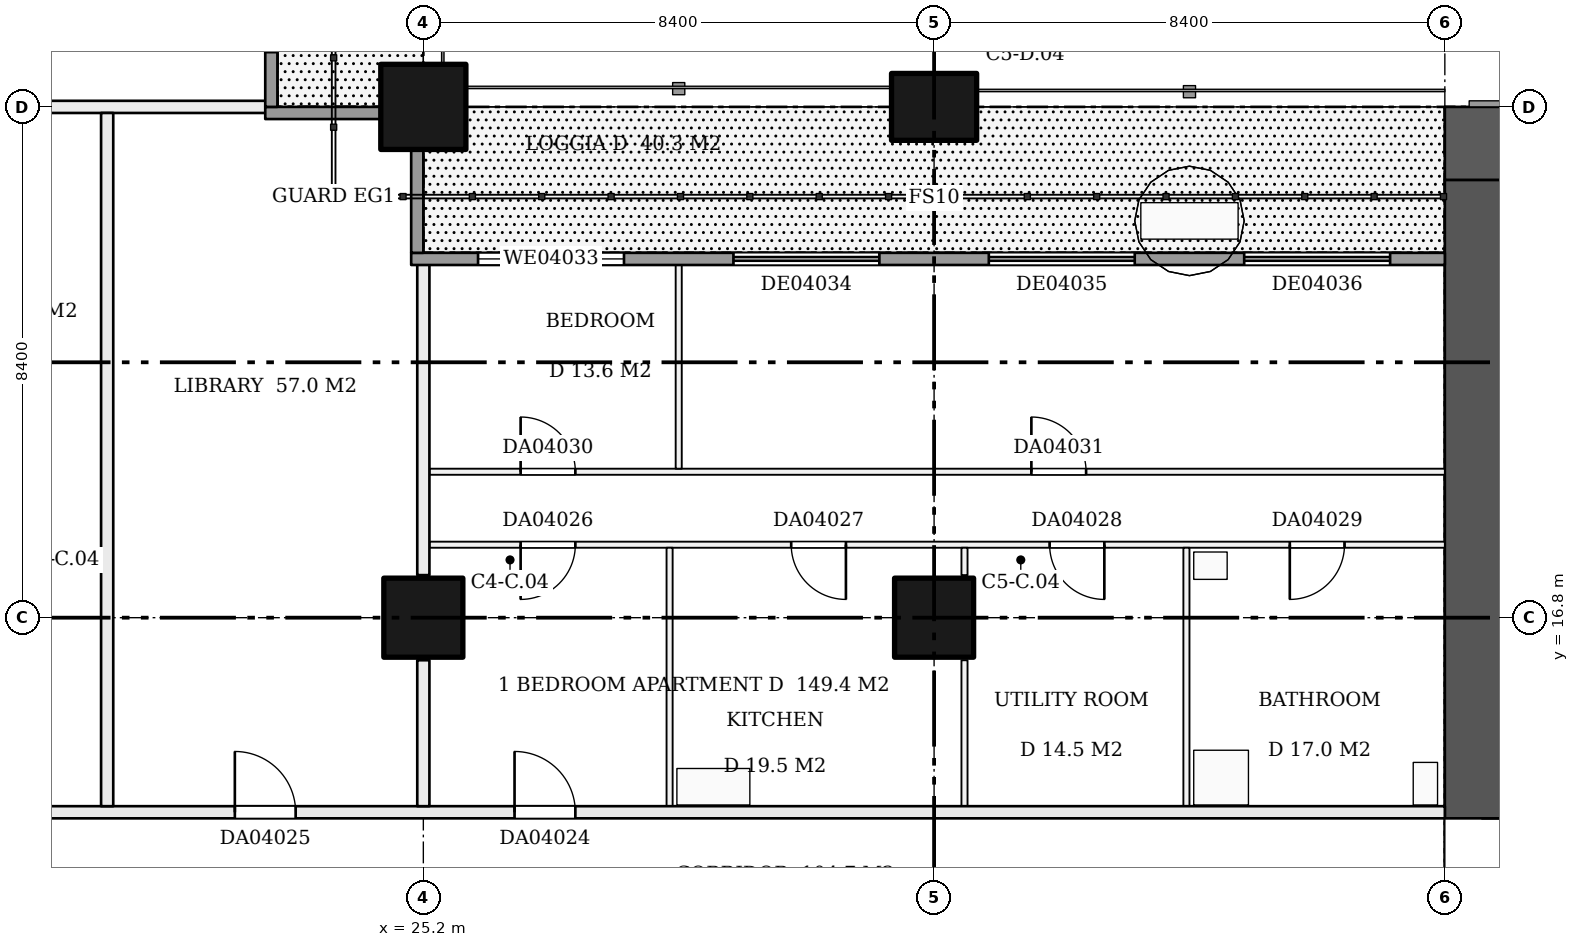
"""IFC4 building model, lengths in metres.
Left out: names, types, materials, properties, quantities, classifications, styles, units other than length and angle.
Written with IfcOpenShell. Run it as: python <this file> out.ifc"""

import sys

from ifc_helpers import new_model, si_unit, direction, frame, frame_2d, origin, origin_2d, place, context, subcontext, project, spatial, rectangle, extrude, element, fill, save


model = new_model("IFC4")
c1 = context("Model", 3, precision=1e-05, world=origin(), true_north=direction((0.0, 1.0)))
c2 = subcontext(c1, "Body", "Model", "MODEL_VIEW")
j1 = project(units=[si_unit("LENGTHUNIT", "METRE"), si_unit("PLANEANGLEUNIT", "RADIAN")], contexts=[c1])
p1 = place(None, origin())
s1 = spatial("IfcSite", under=j1, at=p1, CompositionType="ELEMENT")
p2 = place(p1, origin())
s2 = spatial("IfcBuilding", under=s1, at=p2, CompositionType="ELEMENT")
p3 = place(p2, frame((0.0, 0.0, 25.2)))
s3 = spatial("IfcBuildingStorey", under=s2, at=p3, CompositionType="ELEMENT", Elevation=25.2)
p4 = place(p3, frame((25.2, 16.8, 0.0), z_axis=(0.0, 0.0, 1.0), x_axis=(1.0, 0.0, 0.0)))
e1 = element("IfcColumn", 1, at=p4, inside=s3, PredefinedType="COLUMN", context=c2, shape_type="SweptSolid", body=[
    extrude(rectangle(XDim=1.3, YDim=1.3, at=origin_2d()), origin(), (0.0, 0.0, 1.0), 3.22),
])
p5 = place(p3, frame((25.2, 25.2, 0.0), z_axis=(0.0, 0.0, 1.0), x_axis=(1.0, 0.0, 0.0)))
e2 = element("IfcColumn", 2, at=p5, inside=s3, PredefinedType="COLUMN", context=c2, shape_type="SweptSolid", body=[
    extrude(rectangle(XDim=1.4, YDim=1.4, at=origin_2d()), origin(), (0.0, 0.0, 1.0), 3.22),
])
p6 = place(p3, frame((33.6, 16.8, 0.0), z_axis=(0.0, 0.0, 1.0), x_axis=(1.0, 0.0, 0.0)))
e3 = element("IfcColumn", 3, at=p6, inside=s3, PredefinedType="COLUMN", context=c2, shape_type="SweptSolid", body=[
    extrude(rectangle(XDim=1.3, YDim=1.3, at=origin_2d()), origin(), (0.0, 0.0, 1.0), 3.22),
])
p7 = place(p3, frame((33.6, 25.2, 0.0), z_axis=(0.0, 0.0, 1.0), x_axis=(1.0, 0.0, 0.0)))
e4 = element("IfcColumn", 4, at=p7, inside=s3, PredefinedType="COLUMN", context=c2, shape_type="SweptSolid", body=[
    extrude(rectangle(XDim=1.4, YDim=1.1, at=origin_2d()), origin(), (0.0, 0.0, 1.0), 3.22),
])
p8 = place(p3, frame((42.0, 24.6, 0.0), z_axis=(0.0, 0.0, 1.0), x_axis=(1.0, 0.0, 0.0)))
e5 = element("IfcWall", 5, at=p8, inside=s3, PredefinedType="SHEAR", context=c2, shape_type="SweptSolid", body=[
    extrude(rectangle(XDim=16.8, YDim=1.2, at=frame_2d((8.4, 0.0))), origin(), (0.0, 0.0, 1.0), 3.22),
])
p9 = place(p8, frame((1.8, 0.0, 0.5)))
e6 = element("IfcOpeningElement", 6, at=p9, cuts=e5, PredefinedType="OPENING", context=c2, shape_type="SweptSolid", body=[
    extrude(rectangle(XDim=1.8, YDim=2.4, at=frame_2d((0.9, 1.2))), frame((0.0, 0.61, 0.0), z_axis=(0.0, -1.0, 0.0), x_axis=(1.0, 0.0, 0.0)), (0.0, 0.0, 1.0), 1.22),
])
p10 = place(p8, frame((5.25, 0.0, 1.6)))
e7 = element("IfcOpeningElement", 7, at=p10, cuts=e5, PredefinedType="OPENING", context=c2, shape_type="SweptSolid", body=[
    extrude(rectangle(XDim=3.0, YDim=1.2, at=frame_2d((1.5, 0.6))), frame((0.0, 0.61, 0.0), z_axis=(0.0, -1.0, 0.0), x_axis=(1.0, 0.0, 0.0)), (0.0, 0.0, 1.0), 1.22),
])
p11 = place(p8, frame((12.65, 0.0, 0.5)))
e8 = element("IfcOpeningElement", 8, at=p11, cuts=e5, PredefinedType="OPENING", context=c2, shape_type="SweptSolid", body=[
    extrude(rectangle(XDim=1.8, YDim=2.4, at=frame_2d((0.9, 1.2))), frame((0.0, 0.61, 0.0), z_axis=(0.0, -1.0, 0.0), x_axis=(1.0, 0.0, 0.0)), (0.0, 0.0, 1.0), 1.22),
])
p12 = place(p3, frame((42.6, 9.6, 0.0), z_axis=(0.0, 0.0, 1.0), x_axis=(0.0, 1.0, 0.0)))
e9 = element("IfcWall", 9, at=p12, inside=s3, PredefinedType="SHEAR", context=c2, shape_type="SweptSolid", body=[
    extrude(rectangle(XDim=14.4, YDim=1.2, at=frame_2d((7.2, 0.0))), origin(), (0.0, 0.0, 1.0), 3.22),
])
p13 = place(p12, frame((2.1, 0.0, 0.0)))
e10 = element("IfcOpeningElement", 10, at=p13, cuts=e9, PredefinedType="OPENING", context=c2, shape_type="SweptSolid", body=[
    extrude(rectangle(XDim=1.8, YDim=2.1, at=frame_2d((0.9, 1.05))), frame((0.0, 0.61, 0.0), z_axis=(0.0, -1.0, 0.0), x_axis=(1.0, 0.0, 0.0)), (0.0, 0.0, 1.0), 1.22),
])
p14 = place(p3, frame((16.9, 13.6, 0.0), z_axis=(0.0, 0.0, 1.0), x_axis=(1.0, 0.0, 0.0)))
e11 = element("IfcWall", 11, at=p14, inside=s3, PredefinedType="PARTITIONING", context=c2, shape_type="SweptSolid", body=[
    extrude(rectangle(XDim=25.1, YDim=0.2, at=frame_2d((12.55, 0.0))), origin(), (0.0, 0.0, 1.0), 3.22),
])
p15 = place(p14, frame((9.8, 0.0, 0.0)))
e12 = element("IfcOpeningElement", 12, at=p15, cuts=e11, PredefinedType="OPENING", context=c2, shape_type="SweptSolid", body=[
    extrude(rectangle(XDim=1.0, YDim=2.1, at=frame_2d((0.5, 1.05))), frame((0.0, 0.11, 0.0), z_axis=(0.0, -1.0, 0.0), x_axis=(1.0, 0.0, 0.0)), (0.0, 0.0, 1.0), 0.22),
])
p16 = place(p14, frame((5.2, 0.0, 0.0)))
e13 = element("IfcOpeningElement", 13, at=p16, cuts=e11, PredefinedType="OPENING", context=c2, shape_type="SweptSolid", body=[
    extrude(rectangle(XDim=1.0, YDim=2.1, at=frame_2d((0.5, 1.05))), frame((0.0, 0.11, 0.0), z_axis=(0.0, -1.0, 0.0), x_axis=(1.0, 0.0, 0.0)), (0.0, 0.0, 1.0), 0.22),
])
p17 = place(p3, frame((25.3, 18.0, 0.0), z_axis=(0.0, 0.0, 1.0), x_axis=(1.0, 0.0, 0.0)))
e14 = element("IfcWall", 14, at=p17, inside=s3, PredefinedType="PARTITIONING", context=c2, shape_type="SweptSolid", body=[
    extrude(rectangle(XDim=16.7, YDim=0.1, at=frame_2d((8.35, 0.0))), origin(), (0.0, 0.0, 1.0), 3.22),
])
p18 = place(p17, frame((1.5, 0.0, 0.0)))
e15 = element("IfcOpeningElement", 15, at=p18, cuts=e14, PredefinedType="OPENING", context=c2, shape_type="SweptSolid", body=[
    extrude(rectangle(XDim=0.9, YDim=2.1, at=frame_2d((0.45, 1.05))), frame((0.0, 0.06, 0.0), z_axis=(0.0, -1.0, 0.0), x_axis=(1.0, 0.0, 0.0)), (0.0, 0.0, 1.0), 0.12),
])
p19 = place(p17, frame((5.95, 0.0, 0.0)))
e16 = element("IfcOpeningElement", 16, at=p19, cuts=e14, PredefinedType="OPENING", context=c2, shape_type="SweptSolid", body=[
    extrude(rectangle(XDim=0.9, YDim=2.1, at=frame_2d((0.45, 1.05))), frame((0.0, 0.06, 0.0), z_axis=(0.0, -1.0, 0.0), x_axis=(1.0, 0.0, 0.0)), (0.0, 0.0, 1.0), 0.12),
])
p20 = place(p17, frame((10.2, 0.0, 0.0)))
e17 = element("IfcOpeningElement", 17, at=p20, cuts=e14, PredefinedType="OPENING", context=c2, shape_type="SweptSolid", body=[
    extrude(rectangle(XDim=0.9, YDim=2.1, at=frame_2d((0.45, 1.05))), frame((0.0, 0.06, 0.0), z_axis=(0.0, -1.0, 0.0), x_axis=(1.0, 0.0, 0.0)), (0.0, 0.0, 1.0), 0.12),
])
p21 = place(p17, frame((14.15, 0.0, 0.0)))
e18 = element("IfcOpeningElement", 18, at=p21, cuts=e14, PredefinedType="OPENING", context=c2, shape_type="SweptSolid", body=[
    extrude(rectangle(XDim=0.9, YDim=2.1, at=frame_2d((0.45, 1.05))), frame((0.0, 0.06, 0.0), z_axis=(0.0, -1.0, 0.0), x_axis=(1.0, 0.0, 0.0)), (0.0, 0.0, 1.0), 0.12),
])
p22 = place(p3, frame((25.3, 19.2, 0.0), z_axis=(0.0, 0.0, 1.0), x_axis=(1.0, 0.0, 0.0)))
e19 = element("IfcWall", 19, at=p22, inside=s3, PredefinedType="PARTITIONING", context=c2, shape_type="SweptSolid", body=[
    extrude(rectangle(XDim=16.7, YDim=0.1, at=frame_2d((8.35, 0.0))), origin(), (0.0, 0.0, 1.0), 3.22),
])
p23 = place(p22, frame((1.5, 0.0, 0.0)))
e20 = element("IfcOpeningElement", 20, at=p23, cuts=e19, PredefinedType="OPENING", context=c2, shape_type="SweptSolid", body=[
    extrude(rectangle(XDim=0.9, YDim=2.1, at=frame_2d((0.45, 1.05))), frame((0.0, 0.06, 0.0), z_axis=(0.0, -1.0, 0.0), x_axis=(1.0, 0.0, 0.0)), (0.0, 0.0, 1.0), 0.12),
])
p24 = place(p22, frame((9.9, 0.0, 0.0)))
e21 = element("IfcOpeningElement", 21, at=p24, cuts=e19, PredefinedType="OPENING", context=c2, shape_type="SweptSolid", body=[
    extrude(rectangle(XDim=0.9, YDim=2.1, at=frame_2d((0.45, 1.05))), frame((0.0, 0.06, 0.0), z_axis=(0.0, -1.0, 0.0), x_axis=(1.0, 0.0, 0.0)), (0.0, 0.0, 1.0), 0.12),
])
p25 = place(p3, frame((17.5, 25.2, 0.0), z_axis=(0.0, 0.0, 1.0), x_axis=(1.0, 0.0, 0.0)))
e22 = element("IfcWall", 22, at=p25, inside=s3, PredefinedType="PARTITIONING", context=c2, shape_type="SweptSolid", body=[
    extrude(rectangle(XDim=5.2, YDim=0.2, at=frame_2d((2.6, 0.0))), origin(), (0.0, 0.0, 1.0), 3.22),
])
p26 = place(p3, frame((20.0, 13.7, 0.0), z_axis=(0.0, 0.0, 1.0), x_axis=(0.0, 1.0, 0.0)))
e23 = element("IfcWall", 23, at=p26, inside=s3, PredefinedType="PARTITIONING", context=c2, shape_type="SweptSolid", body=[
    extrude(rectangle(XDim=11.4, YDim=0.2, at=frame_2d((5.7, 0.0))), origin(), (0.0, 0.0, 1.0), 3.22),
])
p27 = place(p3, frame((25.2, 13.7, 0.0), z_axis=(0.0, 0.0, 1.0), x_axis=(0.0, 1.0, 0.0)))
e24 = element("IfcWall", 24, at=p27, inside=s3, PredefinedType="PARTITIONING", context=c2, shape_type="SweptSolid", body=[
    extrude(rectangle(XDim=2.4, YDim=0.2, at=frame_2d((1.2, 0.0))), origin(), (0.0, 0.0, 1.0), 3.22),
])
p28 = place(p3, frame((25.2, 17.5, 0.0), z_axis=(0.0, 0.0, 1.0), x_axis=(0.0, 1.0, 0.0)))
e25 = element("IfcWall", 25, at=p28, inside=s3, PredefinedType="PARTITIONING", context=c2, shape_type="SweptSolid", body=[
    extrude(rectangle(XDim=5.2, YDim=0.2, at=frame_2d((2.6, 0.0))), origin(), (0.0, 0.0, 1.0), 3.22),
])
p29 = place(p3, frame((29.25, 13.7, 0.0), z_axis=(0.0, 0.0, 1.0), x_axis=(0.0, 1.0, 0.0)))
e26 = element("IfcWall", 26, at=p29, inside=s3, PredefinedType="PARTITIONING", context=c2, shape_type="SweptSolid", body=[
    extrude(rectangle(XDim=4.25, YDim=0.1, at=frame_2d((2.125, 0.0))), origin(), (0.0, 0.0, 1.0), 3.22),
])
p30 = place(p3, frame((29.4, 19.25, 0.0), z_axis=(0.0, 0.0, 1.0), x_axis=(0.0, 1.0, 0.0)))
e27 = element("IfcWall", 27, at=p30, inside=s3, PredefinedType="PARTITIONING", context=c2, shape_type="SweptSolid", body=[
    extrude(rectangle(XDim=3.45, YDim=0.1, at=frame_2d((1.725, 0.0))), origin(), (0.0, 0.0, 1.0), 3.22),
])
p31 = place(p3, frame((34.1, 13.7, 0.0), z_axis=(0.0, 0.0, 1.0), x_axis=(0.0, 1.0, 0.0)))
e28 = element("IfcWall", 28, at=p31, inside=s3, PredefinedType="PARTITIONING", context=c2, shape_type="SweptSolid", body=[
    extrude(rectangle(XDim=2.4, YDim=0.1, at=frame_2d((1.2, 0.0))), origin(), (0.0, 0.0, 1.0), 3.22),
])
p32 = place(p3, frame((34.1, 17.5, 0.0), z_axis=(0.0, 0.0, 1.0), x_axis=(0.0, 1.0, 0.0)))
e29 = element("IfcWall", 29, at=p32, inside=s3, PredefinedType="PARTITIONING", context=c2, shape_type="SweptSolid", body=[
    extrude(rectangle(XDim=0.45, YDim=0.1, at=frame_2d((0.225, 0.0))), origin(), (0.0, 0.0, 1.0), 3.22),
])
p33 = place(p3, frame((37.75, 13.7, 0.0), z_axis=(0.0, 0.0, 1.0), x_axis=(0.0, 1.0, 0.0)))
e30 = element("IfcWall", 30, at=p33, inside=s3, PredefinedType="PARTITIONING", context=c2, shape_type="SweptSolid", body=[
    extrude(rectangle(XDim=4.25, YDim=0.1, at=frame_2d((2.125, 0.0))), origin(), (0.0, 0.0, 1.0), 3.22),
])
p34 = place(p3, frame((42.0, 22.7, 0.0), z_axis=(0.0, 0.0, 1.0), x_axis=(-1.0, 0.0, 0.0)))
e31 = element("IfcWall", 31, at=p34, inside=s3, PredefinedType="SOLIDWALL", context=c2, shape_type="SweptSolid", body=[
    extrude(rectangle(XDim=17.0, YDim=0.2, at=frame_2d((8.5, 0.0))), origin(), (0.0, 0.0, 1.0), 3.22),
])
p35 = place(p34, frame((13.5, 0.0, 0.9)))
e32 = element("IfcOpeningElement", 32, at=p35, cuts=e31, PredefinedType="OPENING", context=c2, shape_type="SweptSolid", body=[
    extrude(rectangle(XDim=2.4, YDim=1.5, at=frame_2d((1.2, 0.75))), frame((0.0, 0.11, 0.0), z_axis=(0.0, -1.0, 0.0), x_axis=(1.0, 0.0, 0.0)), (0.0, 0.0, 1.0), 0.22),
])
p36 = place(p34, frame((9.3, 0.0, 0.0)))
e33 = element("IfcOpeningElement", 33, at=p36, cuts=e31, PredefinedType="OPENING", context=c2, shape_type="SweptSolid", body=[
    extrude(rectangle(XDim=2.4, YDim=2.2, at=frame_2d((1.2, 1.1))), frame((0.0, 0.11, 0.0), z_axis=(0.0, -1.0, 0.0), x_axis=(1.0, 0.0, 0.0)), (0.0, 0.0, 1.0), 0.22),
])
p37 = place(p34, frame((5.1, 0.0, 0.0)))
e34 = element("IfcOpeningElement", 34, at=p37, cuts=e31, PredefinedType="OPENING", context=c2, shape_type="SweptSolid", body=[
    extrude(rectangle(XDim=2.4, YDim=2.2, at=frame_2d((1.2, 1.1))), frame((0.0, 0.11, 0.0), z_axis=(0.0, -1.0, 0.0), x_axis=(1.0, 0.0, 0.0)), (0.0, 0.0, 1.0), 0.22),
])
p38 = place(p34, frame((0.9, 0.0, 0.0)))
e35 = element("IfcOpeningElement", 35, at=p38, cuts=e31, PredefinedType="OPENING", context=c2, shape_type="SweptSolid", body=[
    extrude(rectangle(XDim=2.4, YDim=2.2, at=frame_2d((1.2, 1.1))), frame((0.0, 0.11, 0.0), z_axis=(0.0, -1.0, 0.0), x_axis=(1.0, 0.0, 0.0)), (0.0, 0.0, 1.0), 0.22),
])
p39 = place(p3, frame((25.1, 22.8, 0.0), z_axis=(0.0, 0.0, 1.0), x_axis=(0.0, 1.0, 0.0)))
e36 = element("IfcWall", 36, at=p39, inside=s3, PredefinedType="SOLIDWALL", context=c2, shape_type="SweptSolid", body=[
    extrude(rectangle(XDim=1.7, YDim=0.2, at=frame_2d((0.85, 0.0))), origin(), (0.0, 0.0, 1.0), 3.22),
])
p40 = place(p3, frame((24.5, 25.1, 0.0), z_axis=(0.0, 0.0, 1.0), x_axis=(-1.0, 0.0, 0.0)))
e37 = element("IfcWall", 37, at=p40, inside=s3, PredefinedType="SOLIDWALL", context=c2, shape_type="SweptSolid", body=[
    extrude(rectangle(XDim=1.9, YDim=0.2, at=frame_2d((0.95, 0.0))), origin(), (0.0, 0.0, 1.0), 3.22),
])
p41 = place(p3, frame((22.7, 25.2, 0.0), z_axis=(0.0, 0.0, 1.0), x_axis=(0.0, 1.0, 0.0)))
e38 = element("IfcWall", 38, at=p41, inside=s3, PredefinedType="SOLIDWALL", context=c2, shape_type="SweptSolid", body=[
    extrude(rectangle(XDim=16.8, YDim=0.2, at=frame_2d((8.4, 0.0))), origin(), (0.0, 0.0, 1.0), 3.22),
])
p42 = place(p41, frame((0.9, 0.0, 0.0)))
e39 = element("IfcOpeningElement", 39, at=p42, cuts=e38, PredefinedType="OPENING", context=c2, shape_type="SweptSolid", body=[
    extrude(rectangle(XDim=2.4, YDim=2.2, at=frame_2d((1.2, 1.1))), frame((0.0, 0.11, 0.0), z_axis=(0.0, -1.0, 0.0), x_axis=(1.0, 0.0, 0.0)), (0.0, 0.0, 1.0), 0.22),
])
p43 = place(p41, frame((5.1, 0.0, 0.0)))
e40 = element("IfcOpeningElement", 40, at=p43, cuts=e38, PredefinedType="OPENING", context=c2, shape_type="SweptSolid", body=[
    extrude(rectangle(XDim=2.4, YDim=2.2, at=frame_2d((1.2, 1.1))), frame((0.0, 0.11, 0.0), z_axis=(0.0, -1.0, 0.0), x_axis=(1.0, 0.0, 0.0)), (0.0, 0.0, 1.0), 0.22),
])
p44 = place(p41, frame((9.3, 0.0, 0.0)))
e41 = element("IfcOpeningElement", 41, at=p44, cuts=e38, PredefinedType="OPENING", context=c2, shape_type="SweptSolid", body=[
    extrude(rectangle(XDim=2.4, YDim=2.2, at=frame_2d((1.2, 1.1))), frame((0.0, 0.11, 0.0), z_axis=(0.0, -1.0, 0.0), x_axis=(1.0, 0.0, 0.0)), (0.0, 0.0, 1.0), 0.22),
])
p45 = place(p41, frame((13.5, 0.0, 0.9)))
e42 = element("IfcOpeningElement", 42, at=p45, cuts=e38, PredefinedType="OPENING", context=c2, shape_type="SweptSolid", body=[
    extrude(rectangle(XDim=2.4, YDim=1.5, at=frame_2d((1.2, 0.75))), frame((0.0, 0.11, 0.0), z_axis=(0.0, -1.0, 0.0), x_axis=(1.0, 0.0, 0.0)), (0.0, 0.0, 1.0), 0.22),
])
p46 = place(p13, frame((1.8, 0.0, 0.0), z_axis=(0.0, 0.0, 1.0), x_axis=(-1.0, 0.0, 0.0)))
e43 = element("IfcDoor", 43, at=p46, inside=s3, OperationType="DOUBLE_DOOR_SINGLE_SWING", PredefinedType="DOOR", context=c2, shape_type="SweptSolid", body=[
    extrude(rectangle(XDim=1.8, YDim=2.1, at=frame_2d((0.9, 1.05))), frame((0.0, 0.025, 0.0), z_axis=(0.0, -1.0, 0.0), x_axis=(1.0, 0.0, 0.0)), (0.0, 0.0, 1.0), 0.05),
])
fill(e10, e43)
p47 = place(p15, origin())
e44 = element("IfcDoor", 44, at=p47, inside=s3, OperationType="SINGLE_SWING_LEFT", PredefinedType="DOOR", context=c2, shape_type="SweptSolid", body=[
    extrude(rectangle(XDim=1.0, YDim=2.1, at=frame_2d((0.5, 1.05))), frame((0.0, 0.025, 0.0), z_axis=(0.0, -1.0, 0.0), x_axis=(1.0, 0.0, 0.0)), (0.0, 0.0, 1.0), 0.05),
])
fill(e12, e44)
p48 = place(p16, origin())
e45 = element("IfcDoor", 45, at=p48, inside=s3, OperationType="SINGLE_SWING_LEFT", PredefinedType="DOOR", context=c2, shape_type="SweptSolid", body=[
    extrude(rectangle(XDim=1.0, YDim=2.1, at=frame_2d((0.5, 1.05))), frame((0.0, 0.025, 0.0), z_axis=(0.0, -1.0, 0.0), x_axis=(1.0, 0.0, 0.0)), (0.0, 0.0, 1.0), 0.05),
])
fill(e13, e45)
p49 = place(p18, frame((0.9, 0.0, 0.0), z_axis=(0.0, 0.0, 1.0), x_axis=(-1.0, 0.0, 0.0)))
e46 = element("IfcDoor", 46, at=p49, inside=s3, OperationType="SINGLE_SWING_RIGHT", PredefinedType="DOOR", context=c2, shape_type="SweptSolid", body=[
    extrude(rectangle(XDim=0.9, YDim=2.1, at=frame_2d((0.45, 1.05))), frame((0.0, 0.025, 0.0), z_axis=(0.0, -1.0, 0.0), x_axis=(1.0, 0.0, 0.0)), (0.0, 0.0, 1.0), 0.05),
])
fill(e15, e46)
p50 = place(p19, frame((0.9, 0.0, 0.0), z_axis=(0.0, 0.0, 1.0), x_axis=(-1.0, 0.0, 0.0)))
e47 = element("IfcDoor", 47, at=p50, inside=s3, OperationType="SINGLE_SWING_LEFT", PredefinedType="DOOR", context=c2, shape_type="SweptSolid", body=[
    extrude(rectangle(XDim=0.9, YDim=2.1, at=frame_2d((0.45, 1.05))), frame((0.0, 0.025, 0.0), z_axis=(0.0, -1.0, 0.0), x_axis=(1.0, 0.0, 0.0)), (0.0, 0.0, 1.0), 0.05),
])
fill(e16, e47)
p51 = place(p20, frame((0.9, 0.0, 0.0), z_axis=(0.0, 0.0, 1.0), x_axis=(-1.0, 0.0, 0.0)))
e48 = element("IfcDoor", 48, at=p51, inside=s3, OperationType="SINGLE_SWING_LEFT", PredefinedType="DOOR", context=c2, shape_type="SweptSolid", body=[
    extrude(rectangle(XDim=0.9, YDim=2.1, at=frame_2d((0.45, 1.05))), frame((0.0, 0.025, 0.0), z_axis=(0.0, -1.0, 0.0), x_axis=(1.0, 0.0, 0.0)), (0.0, 0.0, 1.0), 0.05),
])
fill(e17, e48)
p52 = place(p21, frame((0.9, 0.0, 0.0), z_axis=(0.0, 0.0, 1.0), x_axis=(-1.0, 0.0, 0.0)))
e49 = element("IfcDoor", 49, at=p52, inside=s3, OperationType="SINGLE_SWING_RIGHT", PredefinedType="DOOR", context=c2, shape_type="SweptSolid", body=[
    extrude(rectangle(XDim=0.9, YDim=2.1, at=frame_2d((0.45, 1.05))), frame((0.0, 0.025, 0.0), z_axis=(0.0, -1.0, 0.0), x_axis=(1.0, 0.0, 0.0)), (0.0, 0.0, 1.0), 0.05),
])
fill(e18, e49)
p53 = place(p23, origin())
e50 = element("IfcDoor", 50, at=p53, inside=s3, OperationType="SINGLE_SWING_LEFT", PredefinedType="DOOR", context=c2, shape_type="SweptSolid", body=[
    extrude(rectangle(XDim=0.9, YDim=2.1, at=frame_2d((0.45, 1.05))), frame((0.0, 0.025, 0.0), z_axis=(0.0, -1.0, 0.0), x_axis=(1.0, 0.0, 0.0)), (0.0, 0.0, 1.0), 0.05),
])
fill(e20, e50)
p54 = place(p24, origin())
e51 = element("IfcDoor", 51, at=p54, inside=s3, OperationType="SINGLE_SWING_LEFT", PredefinedType="DOOR", context=c2, shape_type="SweptSolid", body=[
    extrude(rectangle(XDim=0.9, YDim=2.1, at=frame_2d((0.45, 1.05))), frame((0.0, 0.025, 0.0), z_axis=(0.0, -1.0, 0.0), x_axis=(1.0, 0.0, 0.0)), (0.0, 0.0, 1.0), 0.05),
])
fill(e21, e51)
p55 = place(p35, origin())
e52 = element("IfcWindow", 52, at=p55, inside=s3, PartitioningType="SINGLE_PANEL", PredefinedType="WINDOW", context=c2, shape_type="SweptSolid", body=[
    extrude(rectangle(XDim=2.4, YDim=1.5, at=frame_2d((1.2, 0.75))), frame((0.0, 0.03, 0.0), z_axis=(0.0, -1.0, 0.0), x_axis=(1.0, 0.0, 0.0)), (0.0, 0.0, 1.0), 0.06),
])
fill(e32, e52)
p56 = place(p36, origin())
e53 = element("IfcDoor", 53, at=p56, inside=s3, OperationType="DOUBLE_DOOR_SLIDING", PredefinedType="DOOR", context=c2, shape_type="SweptSolid", body=[
    extrude(rectangle(XDim=2.4, YDim=2.2, at=frame_2d((1.2, 1.1))), frame((0.0, 0.025, 0.0), z_axis=(0.0, -1.0, 0.0), x_axis=(1.0, 0.0, 0.0)), (0.0, 0.0, 1.0), 0.05),
])
fill(e33, e53)
p57 = place(p37, origin())
e54 = element("IfcDoor", 54, at=p57, inside=s3, OperationType="DOUBLE_DOOR_SLIDING", PredefinedType="DOOR", context=c2, shape_type="SweptSolid", body=[
    extrude(rectangle(XDim=2.4, YDim=2.2, at=frame_2d((1.2, 1.1))), frame((0.0, 0.025, 0.0), z_axis=(0.0, -1.0, 0.0), x_axis=(1.0, 0.0, 0.0)), (0.0, 0.0, 1.0), 0.05),
])
fill(e34, e54)
p58 = place(p38, origin())
e55 = element("IfcDoor", 55, at=p58, inside=s3, OperationType="DOUBLE_DOOR_SLIDING", PredefinedType="DOOR", context=c2, shape_type="SweptSolid", body=[
    extrude(rectangle(XDim=2.4, YDim=2.2, at=frame_2d((1.2, 1.1))), frame((0.0, 0.025, 0.0), z_axis=(0.0, -1.0, 0.0), x_axis=(1.0, 0.0, 0.0)), (0.0, 0.0, 1.0), 0.05),
])
fill(e35, e55)
p59 = place(p42, origin())
e56 = element("IfcDoor", 56, at=p59, inside=s3, OperationType="DOUBLE_DOOR_SLIDING", PredefinedType="DOOR", context=c2, shape_type="SweptSolid", body=[
    extrude(rectangle(XDim=2.4, YDim=2.2, at=frame_2d((1.2, 1.1))), frame((0.0, 0.025, 0.0), z_axis=(0.0, -1.0, 0.0), x_axis=(1.0, 0.0, 0.0)), (0.0, 0.0, 1.0), 0.05),
])
fill(e39, e56)
save(model, sys.argv[1])
